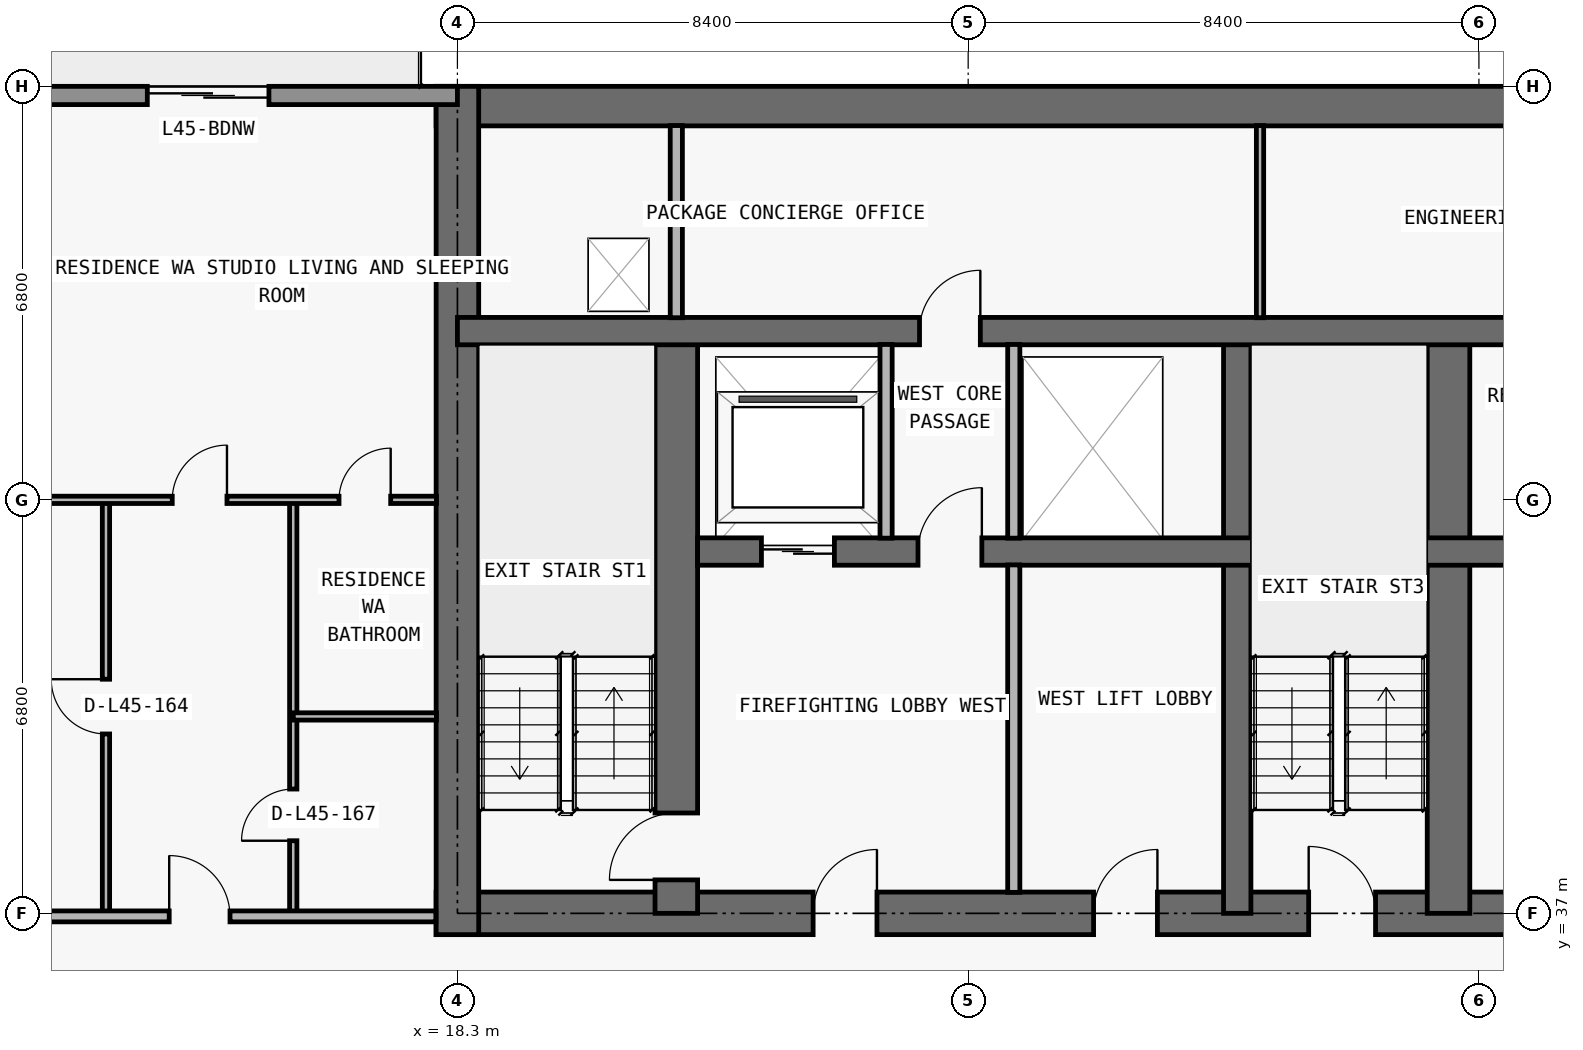
"""IFC4 building model, lengths in metres.
Left out: names, types, materials, properties, quantities, classifications, styles, units other than length and angle.
Written with IfcOpenShell. Run it as: python <this file> out.ifc"""

import sys

from ifc_helpers import new_model, si_unit, direction, frame, frame_2d, origin, place, context, subcontext, project, spatial, rectangle, extrude, element, fill, save


model = new_model("IFC4")
c1 = context("Model", 3, precision=1e-05, world=origin(), true_north=direction((0.0, 1.0)))
c2 = subcontext(c1, "Body", "Model", "MODEL_VIEW")
j1 = project(units=[si_unit("LENGTHUNIT", "METRE"), si_unit("PLANEANGLEUNIT", "RADIAN")], contexts=[c1])
p1 = place(None, origin())
s1 = spatial("IfcSite", under=j1, at=p1, CompositionType="ELEMENT")
p2 = place(p1, origin())
s2 = spatial("IfcBuilding", under=s1, at=p2, CompositionType="ELEMENT")
p3 = place(p2, frame((0.0, 0.0, 163.8)))
s3 = spatial("IfcBuildingStorey", under=s2, at=p3, CompositionType="ELEMENT", Elevation=163.8)
p4 = place(p3, frame((17.95, 37.0, 0.0), z_axis=(0.0, 0.0, 1.0), x_axis=(1.0, 0.0, 0.0)))
e1 = element("IfcWall", 1, at=p4, inside=s3, PredefinedType="SHEAR", context=c2, shape_type="SweptSolid", body=[
    extrude(rectangle(XDim=41.9, YDim=0.7, at=frame_2d((20.95, 0.0))), origin(), (0.0, 0.0, 1.0), 3.05),
])
p5 = place(p4, frame((14.35, 0.0, 0.0)))
e2 = element("IfcOpeningElement", 2, at=p5, cuts=e1, PredefinedType="OPENING", context=c2, shape_type="SweptSolid", body=[
    extrude(rectangle(XDim=1.1, YDim=2.15, at=frame_2d((0.55, 1.075))), frame((0.0, 0.36, 0.0), z_axis=(0.0, -1.0, 0.0), x_axis=(1.0, 0.0, 0.0)), (0.0, 0.0, 1.0), 0.72),
])
p6 = place(p4, frame((6.2, 0.0, 0.0)))
e3 = element("IfcOpeningElement", 3, at=p6, cuts=e1, PredefinedType="OPENING", context=c2, shape_type="SweptSolid", body=[
    extrude(rectangle(XDim=1.05, YDim=2.15, at=frame_2d((0.525, 1.075))), frame((0.0, 0.36, 0.0), z_axis=(0.0, -1.0, 0.0), x_axis=(1.0, 0.0, 0.0)), (0.0, 0.0, 1.0), 0.72),
])
p7 = place(p4, frame((34.7, 0.0, 0.0)))
e4 = element("IfcOpeningElement", 4, at=p7, cuts=e1, PredefinedType="OPENING", context=c2, shape_type="SweptSolid", body=[
    extrude(rectangle(XDim=1.05, YDim=2.15, at=frame_2d((0.525, 1.075))), frame((0.0, 0.36, 0.0), z_axis=(0.0, -1.0, 0.0), x_axis=(1.0, 0.0, 0.0)), (0.0, 0.0, 1.0), 0.72),
])
p8 = place(p4, frame((10.812, 0.0, 0.0)))
e5 = element("IfcOpeningElement", 5, at=p8, cuts=e1, PredefinedType="OPENING", context=c2, shape_type="SweptSolid", body=[
    extrude(rectangle(XDim=1.05, YDim=2.15, at=frame_2d((0.525, 1.075))), frame((0.0, 0.36, 0.0), z_axis=(0.0, -1.0, 0.0), x_axis=(1.0, 0.0, 0.0)), (0.0, 0.0, 1.0), 0.72),
])
p9 = place(p4, frame((24.05, 0.0, 0.0)))
e6 = element("IfcOpeningElement", 6, at=p9, cuts=e1, PredefinedType="OPENING", context=c2, shape_type="SweptSolid", body=[
    extrude(rectangle(XDim=1.05, YDim=2.15, at=frame_2d((0.525, 1.075))), frame((0.0, 0.36, 0.0), z_axis=(0.0, -1.0, 0.0), x_axis=(1.0, 0.0, 0.0)), (0.0, 0.0, 1.0), 0.72),
])
p10 = place(p3, frame((17.95, 50.275, 0.0), z_axis=(0.0, 0.0, 1.0), x_axis=(1.0, 0.0, 0.0)))
e7 = element("IfcWall", 7, at=p10, inside=s3, PredefinedType="SHEAR", context=c2, shape_type="SweptSolid", body=[
    extrude(rectangle(XDim=41.9, YDim=0.65, at=frame_2d((20.95, 0.0))), origin(), (0.0, 0.0, 1.0), 3.05),
])
p11 = place(p3, frame((18.3, 36.65, 0.0), z_axis=(0.0, 0.0, 1.0), x_axis=(0.0, 1.0, 0.0)))
e8 = element("IfcWall", 8, at=p11, inside=s3, PredefinedType="SHEAR", context=c2, shape_type="SweptSolid", body=[
    extrude(rectangle(XDim=13.95, YDim=0.7, at=frame_2d((6.975, 0.0))), origin(), (0.0, 0.0, 1.0), 3.05),
])
p12 = place(p3, frame((21.9, 37.0, 0.0), z_axis=(0.0, 0.0, 1.0), x_axis=(0.0, 1.0, 0.0)))
e9 = element("IfcWall", 9, at=p12, inside=s3, PredefinedType="SHEAR", context=c2, shape_type="SweptSolid", body=[
    extrude(rectangle(XDim=9.575, YDim=0.7, at=frame_2d((4.788, 0.0))), origin(), (0.0, 0.0, 1.0), 3.05),
])
p13 = place(p12, frame((0.55, 0.0, 0.0)))
e10 = element("IfcOpeningElement", 10, at=p13, cuts=e9, PredefinedType="OPENING", context=c2, shape_type="SweptSolid", body=[
    extrude(rectangle(XDim=1.1, YDim=2.15, at=frame_2d((0.55, 1.075))), frame((0.0, 0.36, 0.0), z_axis=(0.0, -1.0, 0.0), x_axis=(1.0, 0.0, 0.0)), (0.0, 0.0, 1.0), 0.72),
])
p14 = place(p3, frame((31.125, 37.0, 0.0), z_axis=(0.0, 0.0, 1.0), x_axis=(0.0, 1.0, 0.0)))
e11 = element("IfcWall", 11, at=p14, inside=s3, PredefinedType="SHEAR", context=c2, shape_type="SweptSolid", body=[
    extrude(rectangle(XDim=9.575, YDim=0.45, at=frame_2d((4.788, 0.0))), origin(), (0.0, 0.0, 1.0), 3.05),
])
p15 = place(p3, frame((34.6, 37.0, 0.0), z_axis=(0.0, 0.0, 1.0), x_axis=(0.0, 1.0, 0.0)))
e12 = element("IfcWall", 12, at=p15, inside=s3, PredefinedType="SHEAR", context=c2, shape_type="SweptSolid", body=[
    extrude(rectangle(XDim=9.575, YDim=0.7, at=frame_2d((4.788, 0.0))), origin(), (0.0, 0.0, 1.0), 3.05),
])
p16 = place(p3, frame((22.25, 42.95, 0.0), z_axis=(0.0, 0.0, 1.0), x_axis=(1.0, 0.0, 0.0)))
e13 = element("IfcWall", 13, at=p16, inside=s3, PredefinedType="SHEAR", context=c2, shape_type="SweptSolid", body=[
    extrude(rectangle(XDim=33.3, YDim=0.45, at=frame_2d((16.65, 0.0))), origin(), (0.0, 0.0, 1.0), 3.05),
])
p17 = place(p16, frame((1.05, 0.0, 0.0)))
e14 = element("IfcOpeningElement", 14, at=p17, cuts=e13, PredefinedType="OPENING", context=c2, shape_type="SweptSolid", body=[
    extrude(rectangle(XDim=1.2, YDim=2.2, at=frame_2d((0.6, 1.1))), frame((0.0, 0.235, 0.0), z_axis=(0.0, -1.0, 0.0), x_axis=(1.0, 0.0, 0.0)), (0.0, 0.0, 1.0), 0.47),
])
p18 = place(p16, frame((31.05, 0.0, 0.0)))
e15 = element("IfcOpeningElement", 15, at=p18, cuts=e13, PredefinedType="OPENING", context=c2, shape_type="SweptSolid", body=[
    extrude(rectangle(XDim=1.2, YDim=2.2, at=frame_2d((0.6, 1.1))), frame((0.0, 0.235, 0.0), z_axis=(0.0, -1.0, 0.0), x_axis=(1.0, 0.0, 0.0)), (0.0, 0.0, 1.0), 0.47),
])
p19 = place(p16, frame((21.4, 0.0, 0.0)))
e16 = element("IfcOpeningElement", 16, at=p19, cuts=e13, PredefinedType="OPENING", context=c2, shape_type="SweptSolid", body=[
    extrude(rectangle(XDim=1.1, YDim=2.2, at=frame_2d((0.55, 1.1))), frame((0.0, 0.235, 0.0), z_axis=(0.0, -1.0, 0.0), x_axis=(1.0, 0.0, 0.0)), (0.0, 0.0, 1.0), 0.47),
])
p20 = place(p16, frame((24.0, 0.0, 0.0)))
e17 = element("IfcOpeningElement", 17, at=p20, cuts=e13, PredefinedType="OPENING", context=c2, shape_type="SweptSolid", body=[
    extrude(rectangle(XDim=1.1, YDim=2.2, at=frame_2d((0.55, 1.1))), frame((0.0, 0.235, 0.0), z_axis=(0.0, -1.0, 0.0), x_axis=(1.0, 0.0, 0.0)), (0.0, 0.0, 1.0), 0.47),
])
p21 = place(p16, frame((3.625, 0.0, 0.0)))
e18 = element("IfcOpeningElement", 18, at=p21, cuts=e13, PredefinedType="OPENING", context=c2, shape_type="SweptSolid", body=[
    extrude(rectangle(XDim=1.05, YDim=2.15, at=frame_2d((0.525, 1.075))), frame((0.0, 0.235, 0.0), z_axis=(0.0, -1.0, 0.0), x_axis=(1.0, 0.0, 0.0)), (0.0, 0.0, 1.0), 0.47),
])
p22 = place(p16, frame((28.675, 0.0, 0.0)))
e19 = element("IfcOpeningElement", 19, at=p22, cuts=e13, PredefinedType="OPENING", context=c2, shape_type="SweptSolid", body=[
    extrude(rectangle(XDim=1.05, YDim=2.15, at=frame_2d((0.525, 1.075))), frame((0.0, 0.235, 0.0), z_axis=(0.0, -1.0, 0.0), x_axis=(1.0, 0.0, 0.0)), (0.0, 0.0, 1.0), 0.47),
])
p23 = place(p16, frame((13.925, 0.0, 0.0)))
e20 = element("IfcOpeningElement", 20, at=p23, cuts=e13, PredefinedType="OPENING", context=c2, shape_type="SweptSolid", body=[
    extrude(rectangle(XDim=1.0, YDim=2.2, at=frame_2d((0.5, 1.1))), frame((0.0, 0.235, 0.0), z_axis=(0.0, -1.0, 0.0), x_axis=(1.0, 0.0, 0.0)), (0.0, 0.0, 1.0), 0.47),
])
p24 = place(p16, frame((18.05, 0.0, 0.0)))
e21 = element("IfcOpeningElement", 21, at=p24, cuts=e13, PredefinedType="OPENING", context=c2, shape_type="SweptSolid", body=[
    extrude(rectangle(XDim=1.0, YDim=2.2, at=frame_2d((0.5, 1.1))), frame((0.0, 0.235, 0.0), z_axis=(0.0, -1.0, 0.0), x_axis=(1.0, 0.0, 0.0)), (0.0, 0.0, 1.0), 0.47),
])
p25 = place(p3, frame((18.3, 46.575, 0.0), z_axis=(0.0, 0.0, 1.0), x_axis=(1.0, 0.0, 0.0)))
e22 = element("IfcWall", 22, at=p25, inside=s3, PredefinedType="SHEAR", context=c2, shape_type="SweptSolid", body=[
    extrude(rectangle(XDim=41.2, YDim=0.45, at=frame_2d((20.6, 0.0))), origin(), (0.0, 0.0, 1.0), 3.05),
])
p26 = place(p25, frame((7.6, 0.0, 0.0)))
e23 = element("IfcOpeningElement", 23, at=p26, cuts=e22, PredefinedType="OPENING", context=c2, shape_type="SweptSolid", body=[
    extrude(rectangle(XDim=1.0, YDim=2.2, at=frame_2d((0.5, 1.1))), frame((0.0, 0.235, 0.0), z_axis=(0.0, -1.0, 0.0), x_axis=(1.0, 0.0, 0.0)), (0.0, 0.0, 1.0), 0.47),
])
p27 = place(p25, frame((32.625, 0.0, 0.0)))
e24 = element("IfcOpeningElement", 24, at=p27, cuts=e22, PredefinedType="OPENING", context=c2, shape_type="SweptSolid", body=[
    extrude(rectangle(XDim=1.05, YDim=2.15, at=frame_2d((0.525, 1.075))), frame((0.0, 0.235, 0.0), z_axis=(0.0, -1.0, 0.0), x_axis=(1.0, 0.0, 0.0)), (0.0, 0.0, 1.0), 0.47),
])
p28 = place(p3, frame((10.1, 50.45, 0.0), z_axis=(0.0, 0.0, 1.0), x_axis=(1.0, 0.0, 0.0)))
e25 = element("IfcWall", 25, at=p28, inside=s3, PredefinedType="STANDARD", context=c2, shape_type="SweptSolid", body=[
    extrude(rectangle(XDim=8.2, YDim=0.3, at=frame_2d((4.1, 0.0))), origin(), (0.0, 0.0, 1.0), 3.05),
])
p29 = place(p28, frame((3.1, 0.0, 0.0)))
e26 = element("IfcOpeningElement", 26, at=p29, cuts=e25, PredefinedType="OPENING", context=c2, shape_type="SweptSolid", body=[
    extrude(rectangle(XDim=2.0, YDim=2.3, at=frame_2d((1.0, 1.15))), frame((0.0, 0.16, 0.0), z_axis=(0.0, -1.0, 0.0), x_axis=(1.0, 0.0, 0.0)), (0.0, 0.0, 1.0), 0.32),
])
p30 = place(p3, frame((12.52, 37.0, 0.0), z_axis=(0.0, 0.0, 1.0), x_axis=(0.0, 1.0, 0.0)))
e27 = element("IfcWall", 27, at=p30, inside=s3, PredefinedType="PARTITIONING", context=c2, shape_type="SweptSolid", body=[
    extrude(rectangle(XDim=6.8, YDim=0.12, at=frame_2d((3.4, 0.0))), origin(), (0.0, 0.0, 1.0), 3.05),
])
p31 = place(p30, frame((2.95, 0.0, 0.0)))
e28 = element("IfcOpeningElement", 28, at=p31, cuts=e27, PredefinedType="OPENING", context=c2, shape_type="SweptSolid", body=[
    extrude(rectangle(XDim=0.9, YDim=2.15, at=frame_2d((0.45, 1.075))), frame((0.0, 0.07, 0.0), z_axis=(0.0, -1.0, 0.0), x_axis=(1.0, 0.0, 0.0)), (0.0, 0.0, 1.0), 0.14),
])
p32 = place(p3, frame((15.6, 37.0, 0.0), z_axis=(0.0, 0.0, 1.0), x_axis=(0.0, 1.0, 0.0)))
e29 = element("IfcWall", 29, at=p32, inside=s3, PredefinedType="PARTITIONING", context=c2, shape_type="SweptSolid", body=[
    extrude(rectangle(XDim=6.8, YDim=0.12, at=frame_2d((3.4, 0.0))), origin(), (0.0, 0.0, 1.0), 3.05),
])
p33 = place(p32, frame((1.194, 0.0, 0.0)))
e30 = element("IfcOpeningElement", 30, at=p33, cuts=e29, PredefinedType="OPENING", context=c2, shape_type="SweptSolid", body=[
    extrude(rectangle(XDim=0.85, YDim=2.1, at=frame_2d((0.425, 1.05))), frame((0.0, 0.07, 0.0), z_axis=(0.0, -1.0, 0.0), x_axis=(1.0, 0.0, 0.0)), (0.0, 0.0, 1.0), 0.14),
])
p34 = place(p3, frame((21.9, 46.795, 0.0), z_axis=(0.0, 0.0, 1.0), x_axis=(0.0, 1.0, 0.0)))
e31 = element("IfcWall", 31, at=p34, inside=s3, PredefinedType="PARTITIONING", context=c2, shape_type="SweptSolid", body=[
    extrude(rectangle(XDim=3.16, YDim=0.2, at=frame_2d((1.58, 0.0))), origin(), (0.0, 0.0, 1.0), 3.05),
])
p35 = place(p3, frame((25.35, 43.17, 0.0), z_axis=(0.0, 0.0, 1.0), x_axis=(0.0, 1.0, 0.0)))
e32 = element("IfcWall", 32, at=p35, inside=s3, PredefinedType="PARTITIONING", context=c2, shape_type="SweptSolid", body=[
    extrude(rectangle(XDim=3.185, YDim=0.2, at=frame_2d((1.593, 0.0))), origin(), (0.0, 0.0, 1.0), 3.05),
])
p36 = place(p3, frame((27.45, 37.345, 0.0), z_axis=(0.0, 0.0, 1.0), x_axis=(0.0, 1.0, 0.0)))
e33 = element("IfcWall", 33, at=p36, inside=s3, PredefinedType="PARTITIONING", context=c2, shape_type="SweptSolid", body=[
    extrude(rectangle(XDim=5.385, YDim=0.2, at=frame_2d((2.692, 0.0))), origin(), (0.0, 0.0, 1.0), 3.05),
])
p37 = place(p3, frame((27.45, 43.17, 0.0), z_axis=(0.0, 0.0, 1.0), x_axis=(0.0, 1.0, 0.0)))
e34 = element("IfcWall", 34, at=p37, inside=s3, PredefinedType="PARTITIONING", context=c2, shape_type="SweptSolid", body=[
    extrude(rectangle(XDim=3.185, YDim=0.2, at=frame_2d((1.593, 0.0))), origin(), (0.0, 0.0, 1.0), 3.05),
])
p38 = place(p3, frame((31.5, 46.795, 0.0), z_axis=(0.0, 0.0, 1.0), x_axis=(0.0, 1.0, 0.0)))
e35 = element("IfcWall", 35, at=p38, inside=s3, PredefinedType="PARTITIONING", context=c2, shape_type="SweptSolid", body=[
    extrude(rectangle(XDim=3.16, YDim=0.12, at=frame_2d((1.58, 0.0))), origin(), (0.0, 0.0, 1.0), 3.05),
])
p39 = place(p3, frame((10.1, 36.95, 0.0), z_axis=(0.0, 0.0, 1.0), x_axis=(1.0, 0.0, 0.0)))
e36 = element("IfcWall", 36, at=p39, inside=s3, PredefinedType="PARTITIONING", context=c2, shape_type="SweptSolid", body=[
    extrude(rectangle(XDim=7.845, YDim=0.18, at=frame_2d((3.922, 0.0))), origin(), (0.0, 0.0, 1.0), 3.05),
])
p40 = place(p39, frame((3.46, 0.0, 0.0)))
e37 = element("IfcOpeningElement", 37, at=p40, cuts=e36, PredefinedType="OPENING", context=c2, shape_type="SweptSolid", body=[
    extrude(rectangle(XDim=1.0, YDim=2.2, at=frame_2d((0.5, 1.1))), frame((0.0, 0.1, 0.0), z_axis=(0.0, -1.0, 0.0), x_axis=(1.0, 0.0, 0.0)), (0.0, 0.0, 1.0), 0.2),
])
p41 = place(p3, frame((15.6, 40.238, 0.0), z_axis=(0.0, 0.0, 1.0), x_axis=(1.0, 0.0, 0.0)))
e38 = element("IfcWall", 38, at=p41, inside=s3, PredefinedType="PARTITIONING", context=c2, shape_type="SweptSolid", body=[
    extrude(rectangle(XDim=2.355, YDim=0.12, at=frame_2d((1.177, 0.0))), origin(), (0.0, 0.0, 1.0), 3.05),
])
p42 = place(p3, frame((6.395, 43.8, 0.0), z_axis=(0.0, 0.0, 1.0), x_axis=(1.0, 0.0, 0.0)))
e39 = element("IfcWall", 39, at=p42, inside=s3, PredefinedType="PARTITIONING", context=c2, shape_type="SweptSolid", body=[
    extrude(rectangle(XDim=11.56, YDim=0.12, at=frame_2d((5.78, 0.0))), origin(), (0.0, 0.0, 1.0), 2.418),
])
p43 = place(p42, frame((7.215, 0.0, 0.0)))
e40 = element("IfcOpeningElement", 40, at=p43, cuts=e39, PredefinedType="OPENING", context=c2, shape_type="SweptSolid", body=[
    extrude(rectangle(XDim=0.9, YDim=2.15, at=frame_2d((0.45, 1.075))), frame((0.0, 0.07, 0.0), z_axis=(0.0, -1.0, 0.0), x_axis=(1.0, 0.0, 0.0)), (0.0, 0.0, 1.0), 0.14),
])
p44 = place(p42, frame((9.958, 0.0, 0.0)))
e41 = element("IfcOpeningElement", 41, at=p44, cuts=e39, PredefinedType="OPENING", context=c2, shape_type="SweptSolid", body=[
    extrude(rectangle(XDim=0.85, YDim=2.1, at=frame_2d((0.425, 1.05))), frame((0.0, 0.07, 0.0), z_axis=(0.0, -1.0, 0.0), x_axis=(1.0, 0.0, 0.0)), (0.0, 0.0, 1.0), 0.14),
])
p45 = place(p29, origin())
e42 = element("IfcDoor", 42, at=p45, inside=s3, OperationType="DOUBLE_DOOR_SLIDING", PredefinedType="DOOR", context=c2, shape_type="SweptSolid", body=[
    extrude(rectangle(XDim=2.0, YDim=2.3, at=frame_2d((1.0, 1.15))), frame((0.0, 0.025, 0.0), z_axis=(0.0, -1.0, 0.0), x_axis=(1.0, 0.0, 0.0)), (0.0, 0.0, 1.0), 0.05),
])
fill(e26, e42)
p46 = place(p17, origin())
e43 = element("IfcDoor", 43, at=p46, inside=s3, OperationType="DOUBLE_DOOR_SLIDING", PredefinedType="DOOR", context=c2, shape_type="SweptSolid", body=[
    extrude(rectangle(XDim=1.2, YDim=2.2, at=frame_2d((0.6, 1.1))), frame((0.0, 0.025, 0.0), z_axis=(0.0, -1.0, 0.0), x_axis=(1.0, 0.0, 0.0)), (0.0, 0.0, 1.0), 0.05),
])
fill(e14, e43)
p47 = place(p5, origin())
e44 = element("IfcDoor", 44, at=p47, inside=s3, OperationType="SINGLE_SWING_LEFT", PredefinedType="DOOR", context=c2, shape_type="SweptSolid", body=[
    extrude(rectangle(XDim=1.1, YDim=2.15, at=frame_2d((0.55, 1.075))), frame((0.0, 0.025, 0.0), z_axis=(0.0, -1.0, 0.0), x_axis=(1.0, 0.0, 0.0)), (0.0, 0.0, 1.0), 0.05),
])
fill(e2, e44)
p48 = place(p6, origin())
e45 = element("IfcDoor", 45, at=p48, inside=s3, OperationType="SINGLE_SWING_RIGHT", PredefinedType="DOOR", context=c2, shape_type="SweptSolid", body=[
    extrude(rectangle(XDim=1.05, YDim=2.15, at=frame_2d((0.525, 1.075))), frame((0.0, 0.025, 0.0), z_axis=(0.0, -1.0, 0.0), x_axis=(1.0, 0.0, 0.0)), (0.0, 0.0, 1.0), 0.05),
])
fill(e3, e45)
p49 = place(p13, origin())
e46 = element("IfcDoor", 46, at=p49, inside=s3, OperationType="SINGLE_SWING_LEFT", PredefinedType="DOOR", context=c2, shape_type="SweptSolid", body=[
    extrude(rectangle(XDim=1.1, YDim=2.15, at=frame_2d((0.55, 1.075))), frame((0.0, 0.025, 0.0), z_axis=(0.0, -1.0, 0.0), x_axis=(1.0, 0.0, 0.0)), (0.0, 0.0, 1.0), 0.05),
])
fill(e10, e46)
p50 = place(p21, origin())
e47 = element("IfcDoor", 47, at=p50, inside=s3, OperationType="SINGLE_SWING_RIGHT", PredefinedType="DOOR", context=c2, shape_type="SweptSolid", body=[
    extrude(rectangle(XDim=1.05, YDim=2.15, at=frame_2d((0.525, 1.075))), frame((0.0, 0.025, 0.0), z_axis=(0.0, -1.0, 0.0), x_axis=(1.0, 0.0, 0.0)), (0.0, 0.0, 1.0), 0.05),
])
fill(e18, e47)
p51 = place(p8, origin())
e48 = element("IfcDoor", 48, at=p51, inside=s3, OperationType="SINGLE_SWING_RIGHT", PredefinedType="DOOR", context=c2, shape_type="SweptSolid", body=[
    extrude(rectangle(XDim=1.05, YDim=2.15, at=frame_2d((0.525, 1.075))), frame((0.0, 0.025, 0.0), z_axis=(0.0, -1.0, 0.0), x_axis=(1.0, 0.0, 0.0)), (0.0, 0.0, 1.0), 0.05),
])
fill(e5, e48)
p52 = place(p26, origin())
e49 = element("IfcDoor", 49, at=p52, inside=s3, OperationType="SINGLE_SWING_RIGHT", PredefinedType="DOOR", context=c2, shape_type="SweptSolid", body=[
    extrude(rectangle(XDim=1.0, YDim=2.2, at=frame_2d((0.5, 1.1))), frame((0.0, 0.025, 0.0), z_axis=(0.0, -1.0, 0.0), x_axis=(1.0, 0.0, 0.0)), (0.0, 0.0, 1.0), 0.05),
])
fill(e23, e49)
p53 = place(p31, origin())
e50 = element("IfcDoor", 50, at=p53, inside=s3, OperationType="SINGLE_SWING_RIGHT", PredefinedType="DOOR", context=c2, shape_type="SweptSolid", body=[
    extrude(rectangle(XDim=0.9, YDim=2.15, at=frame_2d((0.45, 1.075))), frame((0.0, 0.025, 0.0), z_axis=(0.0, -1.0, 0.0), x_axis=(1.0, 0.0, 0.0)), (0.0, 0.0, 1.0), 0.05),
])
fill(e28, e50)
p54 = place(p40, origin())
e51 = element("IfcDoor", 51, at=p54, inside=s3, OperationType="SINGLE_SWING_LEFT", PredefinedType="DOOR", context=c2, shape_type="SweptSolid", body=[
    extrude(rectangle(XDim=1.0, YDim=2.2, at=frame_2d((0.5, 1.1))), frame((0.0, 0.025, 0.0), z_axis=(0.0, -1.0, 0.0), x_axis=(1.0, 0.0, 0.0)), (0.0, 0.0, 1.0), 0.05),
])
fill(e37, e51)
p55 = place(p43, origin())
e52 = element("IfcDoor", 52, at=p55, inside=s3, OperationType="SINGLE_SWING_RIGHT", PredefinedType="DOOR", context=c2, shape_type="SweptSolid", body=[
    extrude(rectangle(XDim=0.9, YDim=2.15, at=frame_2d((0.45, 1.075))), frame((0.0, 0.025, 0.0), z_axis=(0.0, -1.0, 0.0), x_axis=(1.0, 0.0, 0.0)), (0.0, 0.0, 1.0), 0.05),
])
fill(e40, e52)
p56 = place(p33, origin())
e53 = element("IfcDoor", 53, at=p56, inside=s3, OperationType="SINGLE_SWING_LEFT", PredefinedType="DOOR", context=c2, shape_type="SweptSolid", body=[
    extrude(rectangle(XDim=0.85, YDim=2.1, at=frame_2d((0.425, 1.05))), frame((0.0, 0.025, 0.0), z_axis=(0.0, -1.0, 0.0), x_axis=(1.0, 0.0, 0.0)), (0.0, 0.0, 1.0), 0.05),
])
fill(e30, e53)
p57 = place(p44, origin())
e54 = element("IfcDoor", 54, at=p57, inside=s3, OperationType="SINGLE_SWING_RIGHT", PredefinedType="DOOR", context=c2, shape_type="SweptSolid", body=[
    extrude(rectangle(XDim=0.85, YDim=2.1, at=frame_2d((0.425, 1.05))), frame((0.0, 0.025, 0.0), z_axis=(0.0, -1.0, 0.0), x_axis=(1.0, 0.0, 0.0)), (0.0, 0.0, 1.0), 0.05),
])
fill(e41, e54)
save(model, sys.argv[1])
